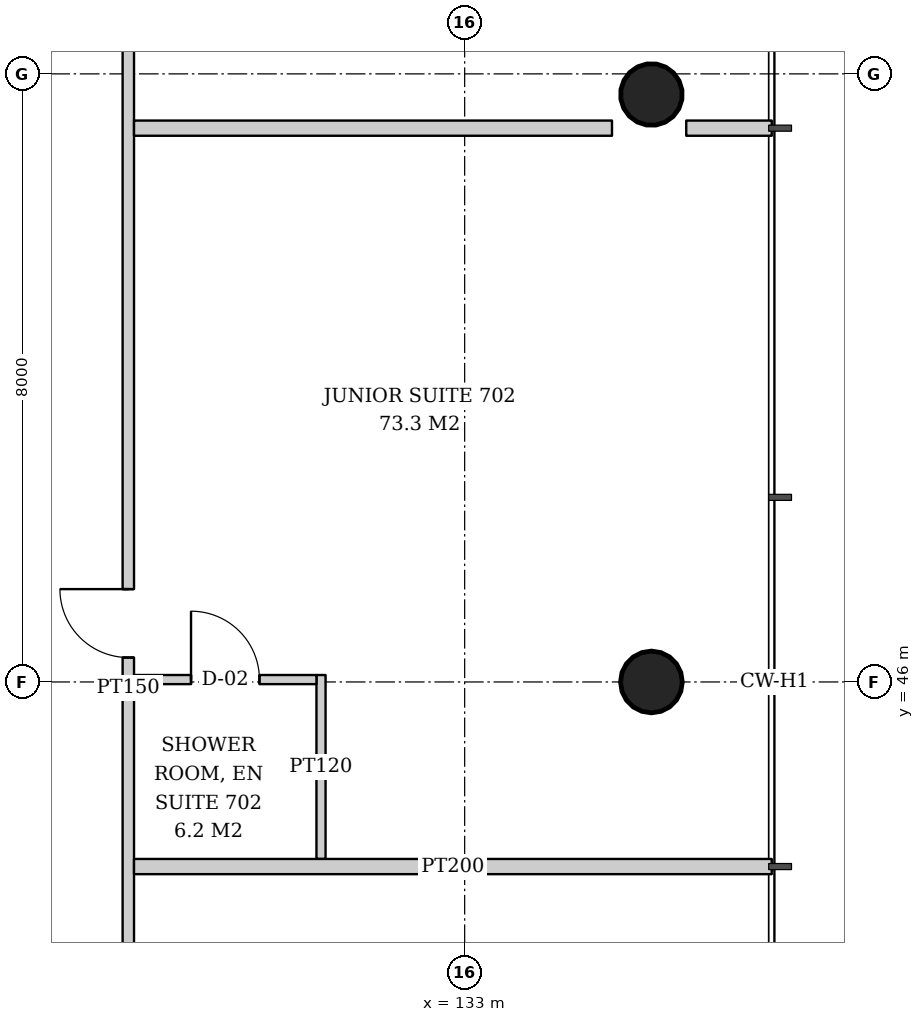
"""IFC4 building model, lengths in metres.
Left out: names, types, materials, properties, quantities, classifications, styles, units other than length and angle.
Written with IfcOpenShell. Run it as: python <this file> out.ifc"""

import sys

from ifc_helpers import new_model, si_unit, direction, frame, frame_2d, origin, origin_2d, place, context, subcontext, project, spatial, rectangle, hollow_circle, extrude, element, fill, save


model = new_model("IFC4")
c1 = context("Model", 3, precision=1e-05, world=origin(), true_north=direction((0.0, 1.0)))
c2 = subcontext(c1, "Body", "Model", "MODEL_VIEW")
j1 = project(units=[si_unit("LENGTHUNIT", "METRE"), si_unit("PLANEANGLEUNIT", "RADIAN")], contexts=[c1])
p1 = place(None, origin())
s1 = spatial("IfcSite", under=j1, at=p1, CompositionType="ELEMENT")
p2 = place(p1, origin())
s2 = spatial("IfcBuilding", under=s1, at=p2, CompositionType="ELEMENT")
p3 = place(p2, frame((0.0, 0.0, 32.4)))
s3 = spatial("IfcBuildingStorey", under=s2, at=p3, CompositionType="ELEMENT", Elevation=32.4)
p4 = place(p3, frame((135.509, 46.0, 0.0), z_axis=(-0.043069538298, 0.0, 0.999072076915), x_axis=(0.0, -1.0, 0.0)))
e1 = element("IfcColumn", 1, at=p4, inside=s3, PredefinedType="COLUMN", context=c2, shape_type="SweptSolid", body=[
    extrude(hollow_circle(Radius=0.406, WallThickness=0.03, at=origin_2d()), origin(), (0.0, 0.0, 1.0), 3.803),
])
p5 = place(p3, frame((135.509, 53.754, 0.0), z_axis=(-0.043059525333, -0.021561848751, 0.998839808957), x_axis=(0.44774654769, -0.894160516368, 0.0)))
e2 = element("IfcColumn", 2, at=p5, inside=s3, PredefinedType="COLUMN", context=c2, shape_type="SweptSolid", body=[
    extrude(hollow_circle(Radius=0.406, WallThickness=0.03, at=origin_2d()), origin(), (0.0, 0.0, 1.0), 3.804),
])
p6 = place(p3, frame((131.11, 43.671, 0.0), z_axis=(0.0, 0.0, 1.0), x_axis=(0.0, 1.0, 0.0)))
e3 = element("IfcWall", 3, at=p6, inside=s3, PredefinedType="PARTITIONING", context=c2, shape_type="SweptSolid", body=[
    extrude(rectangle(XDim=2.42, YDim=0.12, at=frame_2d((1.21, 0.0))), origin(), (0.0, 0.0, 1.0), 2.847),
])
p7 = place(p3, frame((128.65, 46.031, 0.0), z_axis=(0.0, 0.0, 1.0), x_axis=(1.0, 0.0, 0.0)))
e4 = element("IfcWall", 4, at=p7, inside=s3, PredefinedType="PARTITIONING", context=c2, shape_type="SweptSolid", body=[
    extrude(rectangle(XDim=2.4, YDim=0.12, at=frame_2d((1.2, 0.0))), origin(), (0.0, 0.0, 1.0), 3.6),
])
p8 = place(p7, frame((0.75, 0.0, 0.0)))
e5 = element("IfcOpeningElement", 5, at=p8, cuts=e4, PredefinedType="OPENING", context=c2, shape_type="SweptSolid", body=[
    extrude(rectangle(XDim=0.9, YDim=2.1, at=frame_2d((0.45, 1.05))), frame((0.0, 0.07, 0.0), z_axis=(0.0, -1.0, 0.0), x_axis=(1.0, 0.0, 0.0)), (0.0, 0.0, 1.0), 0.14),
])
p9 = place(p3, frame((128.575, 34.35, 0.0), z_axis=(0.0, 0.0, 1.0), x_axis=(0.0, 1.0, 0.0)))
e6 = element("IfcWall", 6, at=p9, inside=s3, PredefinedType="PARTITIONING", context=c2, shape_type="SweptSolid", body=[
    extrude(rectangle(XDim=23.15, YDim=0.15, at=frame_2d((11.575, 0.0))), origin(), (0.0, 0.0, 1.0), 2.8),
])
p10 = place(p9, frame((1.757, 0.0, 0.0)))
e7 = element("IfcOpeningElement", 7, at=p10, cuts=e6, PredefinedType="OPENING", context=c2, shape_type="SweptSolid", body=[
    extrude(rectangle(XDim=0.9, YDim=2.1, at=frame_2d((0.45, 1.05))), frame((0.0, 0.085, 0.0), z_axis=(0.0, -1.0, 0.0), x_axis=(1.0, 0.0, 0.0)), (0.0, 0.0, 1.0), 0.17),
])
p11 = place(p9, frame((11.971, 0.0, 0.0)))
e8 = element("IfcOpeningElement", 8, at=p11, cuts=e6, PredefinedType="OPENING", context=c2, shape_type="SweptSolid", body=[
    extrude(rectangle(XDim=0.9, YDim=2.1, at=frame_2d((0.45, 1.05))), frame((0.0, 0.085, 0.0), z_axis=(0.0, -1.0, 0.0), x_axis=(1.0, 0.0, 0.0)), (0.0, 0.0, 1.0), 0.17),
])
p12 = place(p3, frame((128.65, 43.572, 0.0), z_axis=(0.0, 0.0, 1.0), x_axis=(1.0, 0.0, 0.0)))
e9 = element("IfcWall", 9, at=p12, inside=s3, PredefinedType="PARTITIONING", context=c2, shape_type="SweptSolid", body=[
    extrude(rectangle(XDim=8.39, YDim=0.2, at=frame_2d((4.195, 0.0))), origin(), (0.0, 0.0, 1.0), 3.05),
])
p13 = place(p3, frame((128.65, 53.286, 0.0), z_axis=(0.0, 0.0, 1.0), x_axis=(1.0, 0.0, 0.0)))
e10 = element("IfcWall", 10, at=p13, inside=s3, PredefinedType="PARTITIONING", context=c2, shape_type="SweptSolid", body=[
    extrude(rectangle(XDim=6.288, YDim=0.2, at=frame_2d((3.144, 0.0))), origin(), (0.0, 0.0, 1.0), 3.6),
])
p14 = place(p3, frame((135.915, 53.286, 0.0), z_axis=(0.0, 0.0, 1.0), x_axis=(1.0, 0.0, 0.0)))
e11 = element("IfcWall", 11, at=p14, inside=s3, PredefinedType="PARTITIONING", context=c2, shape_type="SweptSolid", body=[
    extrude(rectangle(XDim=1.125, YDim=0.2, at=frame_2d((0.562, 0.0))), origin(), (0.0, 0.0, 1.0), 3.6),
])
p15 = place(p8, origin())
e12 = element("IfcDoor", 12, at=p15, inside=s3, OperationType="SINGLE_SWING_LEFT", PredefinedType="DOOR", context=c2, shape_type="SweptSolid", body=[
    extrude(rectangle(XDim=0.9, YDim=2.1, at=frame_2d((0.45, 1.05))), frame((0.0, 0.025, 0.0), z_axis=(0.0, -1.0, 0.0), x_axis=(1.0, 0.0, 0.0)), (0.0, 0.0, 1.0), 0.05),
])
fill(e5, e12)
p16 = place(p11, origin())
e13 = element("IfcDoor", 13, at=p16, inside=s3, OperationType="SINGLE_SWING_RIGHT", PredefinedType="DOOR", context=c2, shape_type="SweptSolid", body=[
    extrude(rectangle(XDim=0.9, YDim=2.1, at=frame_2d((0.45, 1.05))), frame((0.0, 0.025, 0.0), z_axis=(0.0, -1.0, 0.0), x_axis=(1.0, 0.0, 0.0)), (0.0, 0.0, 1.0), 0.05),
])
fill(e8, e13)
save(model, sys.argv[1])
